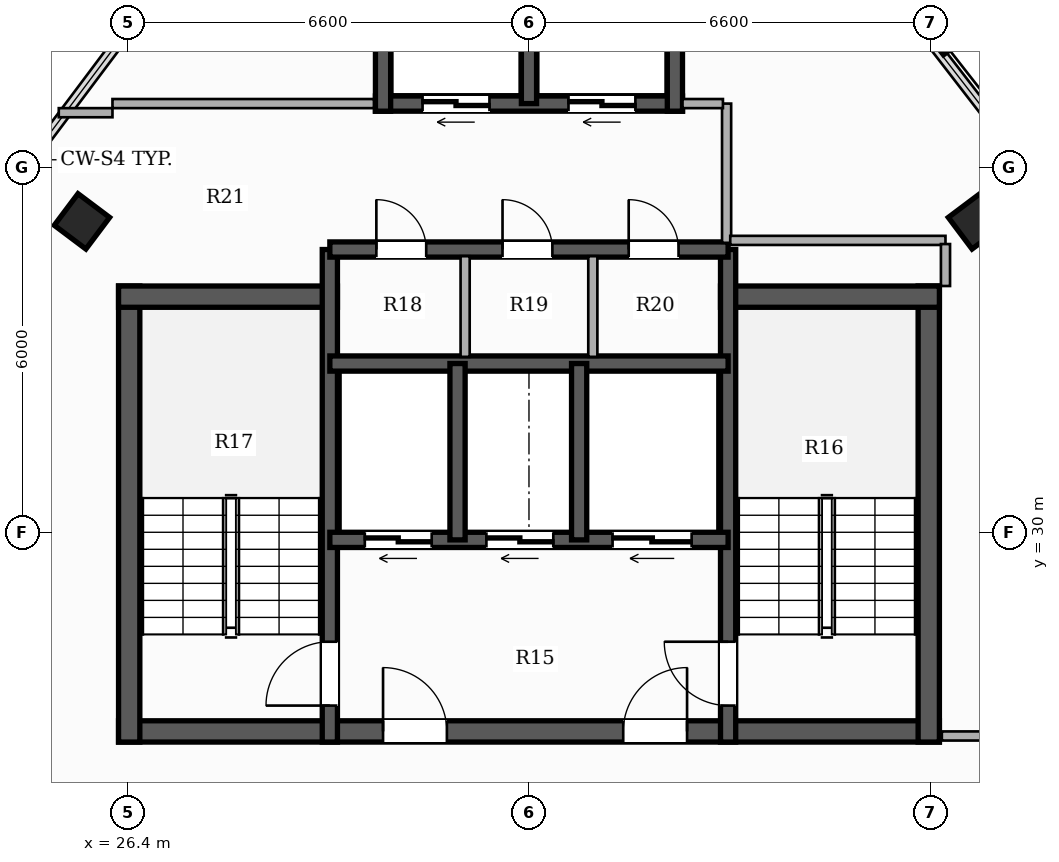
"""IFC4 building model, lengths in metres.
Left out: names, types, materials, properties, quantities, classifications, styles, units other than length and angle.
Written with IfcOpenShell. Run it as: python <this file> out.ifc"""

import sys

from ifc_helpers import new_model, si_unit, direction, frame, frame_2d, origin, origin_2d, place, context, subcontext, project, spatial, rectangle, hollow_rectangle, extrude, element, fill, save


model = new_model("IFC4")
c1 = context("Model", 3, precision=1e-05, world=origin(), true_north=direction((0.0, 1.0)))
c2 = subcontext(c1, "Body", "Model", "MODEL_VIEW")
j1 = project(units=[si_unit("LENGTHUNIT", "METRE"), si_unit("PLANEANGLEUNIT", "RADIAN")], contexts=[c1])
p1 = place(None, origin())
s1 = spatial("IfcSite", under=j1, at=p1, CompositionType="ELEMENT")
p2 = place(p1, origin())
s2 = spatial("IfcBuilding", under=s1, at=p2, CompositionType="ELEMENT")
p3 = place(p2, frame((0.0, 0.0, 263.45)))
s3 = spatial("IfcBuildingStorey", under=s2, at=p3, CompositionType="ELEMENT", Elevation=263.45)
p4 = place(p3, frame((26.25, 26.725, 0.0), z_axis=(0.0, 0.0, 1.0), x_axis=(1.0, 0.0, 0.0)))
e1 = element("IfcWall", 1, at=p4, inside=s3, PredefinedType="SHEAR", context=c2, shape_type="SweptSolid", body=[
    extrude(rectangle(XDim=13.5, YDim=0.35, at=frame_2d((6.75, 0.0))), origin(), (0.0, 0.0, 1.0), 3.3),
])
p5 = place(p4, frame((4.35, 0.0, 0.0)))
e2 = element("IfcOpeningElement", 2, at=p5, cuts=e1, PredefinedType="OPENING", context=c2, shape_type="SweptSolid", body=[
    extrude(rectangle(XDim=1.05, YDim=2.15, at=frame_2d((0.525, 1.075))), frame((0.0, 0.185, 0.0), z_axis=(0.0, -1.0, 0.0), x_axis=(1.0, 0.0, 0.0)), (0.0, 0.0, 1.0), 0.37),
])
p6 = place(p4, frame((8.3, 0.0, 0.0)))
e3 = element("IfcOpeningElement", 3, at=p6, cuts=e1, PredefinedType="OPENING", context=c2, shape_type="SweptSolid", body=[
    extrude(rectangle(XDim=1.05, YDim=2.15, at=frame_2d((0.525, 1.075))), frame((0.0, 0.185, 0.0), z_axis=(0.0, -1.0, 0.0), x_axis=(1.0, 0.0, 0.0)), (0.0, 0.0, 1.0), 0.37),
])
p7 = place(p3, frame((26.425, 26.55, 0.0), z_axis=(0.0, 0.0, 1.0), x_axis=(0.0, 1.0, 0.0)))
e4 = element("IfcWall", 4, at=p7, inside=s3, PredefinedType="SHEAR", context=c2, shape_type="SweptSolid", body=[
    extrude(rectangle(XDim=7.5, YDim=0.35, at=frame_2d((3.75, 0.0))), origin(), (0.0, 0.0, 1.0), 3.3),
])
p8 = place(p3, frame((26.25, 33.875, 0.0), z_axis=(0.0, 0.0, 1.0), x_axis=(1.0, 0.0, 0.0)))
e5 = element("IfcWall", 5, at=p8, inside=s3, PredefinedType="SHEAR", context=c2, shape_type="SweptSolid", body=[
    extrude(rectangle(XDim=3.6, YDim=0.35, at=frame_2d((1.8, 0.0))), origin(), (0.0, 0.0, 1.0), 3.3),
])
p9 = place(p3, frame((39.575, 26.55, 0.0), z_axis=(0.0, 0.0, 1.0), x_axis=(0.0, 1.0, 0.0)))
e6 = element("IfcWall", 6, at=p9, inside=s3, PredefinedType="SHEAR", context=c2, shape_type="SweptSolid", body=[
    extrude(rectangle(XDim=7.5, YDim=0.35, at=frame_2d((3.75, 0.0))), origin(), (0.0, 0.0, 1.0), 3.3),
])
p10 = place(p3, frame((36.15, 33.875, 0.0), z_axis=(0.0, 0.0, 1.0), x_axis=(1.0, 0.0, 0.0)))
e7 = element("IfcWall", 7, at=p10, inside=s3, PredefinedType="SHEAR", context=c2, shape_type="SweptSolid", body=[
    extrude(rectangle(XDim=3.6, YDim=0.35, at=frame_2d((1.8, 0.0))), origin(), (0.0, 0.0, 1.0), 3.3),
])
p11 = place(p3, frame((29.725, 26.55, 0.0), z_axis=(0.0, 0.0, 1.0), x_axis=(0.0, 1.0, 0.0)))
e8 = element("IfcWall", 8, at=p11, inside=s3, PredefinedType="SHEAR", context=c2, shape_type="SweptSolid", body=[
    extrude(rectangle(XDim=8.1, YDim=0.25, at=frame_2d((4.05, 0.0))), origin(), (0.0, 0.0, 1.0), 3.3),
])
p12 = place(p11, frame((0.6, 0.0, 0.0)))
e9 = element("IfcOpeningElement", 9, at=p12, cuts=e8, PredefinedType="OPENING", context=c2, shape_type="SweptSolid", body=[
    extrude(rectangle(XDim=1.05, YDim=2.15, at=frame_2d((0.525, 1.075))), frame((0.0, 0.135, 0.0), z_axis=(0.0, -1.0, 0.0), x_axis=(1.0, 0.0, 0.0)), (0.0, 0.0, 1.0), 0.27),
])
p13 = place(p3, frame((36.275, 26.55, 0.0), z_axis=(0.0, 0.0, 1.0), x_axis=(0.0, 1.0, 0.0)))
e10 = element("IfcWall", 10, at=p13, inside=s3, PredefinedType="SHEAR", context=c2, shape_type="SweptSolid", body=[
    extrude(rectangle(XDim=8.1, YDim=0.25, at=frame_2d((4.05, 0.0))), origin(), (0.0, 0.0, 1.0), 3.3),
])
p14 = place(p13, frame((0.6, 0.0, 0.0)))
e11 = element("IfcOpeningElement", 11, at=p14, cuts=e10, PredefinedType="OPENING", context=c2, shape_type="SweptSolid", body=[
    extrude(rectangle(XDim=1.05, YDim=2.15, at=frame_2d((0.525, 1.075))), frame((0.0, 0.135, 0.0), z_axis=(0.0, -1.0, 0.0), x_axis=(1.0, 0.0, 0.0)), (0.0, 0.0, 1.0), 0.27),
])
p15 = place(p3, frame((36.275, 29.875, 0.0), z_axis=(0.0, 0.0, 1.0), x_axis=(-1.0, 0.0, 0.0)))
e12 = element("IfcWall", 12, at=p15, inside=s3, PredefinedType="SHEAR", context=c2, shape_type="SweptSolid", body=[
    extrude(rectangle(XDim=6.55, YDim=0.25, at=frame_2d((3.275, 0.0))), origin(), (0.0, 0.0, 1.0), 3.3),
])
p16 = place(p15, frame((4.875, 0.0, 0.0)))
e13 = element("IfcOpeningElement", 13, at=p16, cuts=e12, PredefinedType="OPENING", context=c2, shape_type="SweptSolid", body=[
    extrude(rectangle(XDim=1.1, YDim=2.2, at=frame_2d((0.55, 1.1))), frame((0.0, 0.135, 0.0), z_axis=(0.0, -1.0, 0.0), x_axis=(1.0, 0.0, 0.0)), (0.0, 0.0, 1.0), 0.27),
])
p17 = place(p15, frame((2.875, 0.0, 0.0)))
e14 = element("IfcOpeningElement", 14, at=p17, cuts=e12, PredefinedType="OPENING", context=c2, shape_type="SweptSolid", body=[
    extrude(rectangle(XDim=1.1, YDim=2.2, at=frame_2d((0.55, 1.1))), frame((0.0, 0.135, 0.0), z_axis=(0.0, -1.0, 0.0), x_axis=(1.0, 0.0, 0.0)), (0.0, 0.0, 1.0), 0.27),
])
p18 = place(p15, frame((0.6, 0.0, 0.0)))
e15 = element("IfcOpeningElement", 15, at=p18, cuts=e12, PredefinedType="OPENING", context=c2, shape_type="SweptSolid", body=[
    extrude(rectangle(XDim=1.3, YDim=2.2, at=frame_2d((0.65, 1.1))), frame((0.0, 0.135, 0.0), z_axis=(0.0, -1.0, 0.0), x_axis=(1.0, 0.0, 0.0)), (0.0, 0.0, 1.0), 0.27),
])
p19 = place(p3, frame((29.725, 32.775, 0.0), z_axis=(0.0, 0.0, 1.0), x_axis=(1.0, 0.0, 0.0)))
e16 = element("IfcWall", 16, at=p19, inside=s3, PredefinedType="SHEAR", context=c2, shape_type="SweptSolid", body=[
    extrude(rectangle(XDim=6.55, YDim=0.25, at=frame_2d((3.275, 0.0))), origin(), (0.0, 0.0, 1.0), 3.3),
])
for number, where, z_axis, x_axis in (
    (17, (31.825, 29.875, 0.0), (0.0, 0.0, 1.0), (0.0, 1.0, 0.0)),
    (18, (33.825, 29.875, 0.0), (0.0, 0.0, 1.0), (0.0, 1.0, 0.0)),
):
    element("IfcWall", number, at=place(p3, frame(where, z_axis=z_axis, x_axis=x_axis)), inside=s3, PredefinedType="SHEAR", context=c2, shape_type="SweptSolid", body=[
        extrude(rectangle(XDim=2.9, YDim=0.25, at=frame_2d((1.45, 0.0))), origin(), (0.0, 0.0, 1.0), 3.3),
    ])
p20 = place(p3, frame((29.725, 34.65, 0.0), z_axis=(0.0, 0.0, 1.0), x_axis=(1.0, 0.0, 0.0)))
e19 = element("IfcWall", 19, at=p20, inside=s3, PredefinedType="SHEAR", context=c2, shape_type="SweptSolid", body=[
    extrude(rectangle(XDim=6.55, YDim=0.25, at=frame_2d((3.275, 0.0))), origin(), (0.0, 0.0, 1.0), 3.3),
])
p21 = place(p20, frame((0.765, 0.0, 0.0)))
e20 = element("IfcOpeningElement", 20, at=p21, cuts=e19, PredefinedType="OPENING", context=c2, shape_type="SweptSolid", body=[
    extrude(rectangle(XDim=0.82, YDim=2.1, at=frame_2d((0.41, 1.05))), frame((0.0, 0.135, 0.0), z_axis=(0.0, -1.0, 0.0), x_axis=(1.0, 0.0, 0.0)), (0.0, 0.0, 1.0), 0.27),
])
p22 = place(p20, frame((2.84, 0.0, 0.0)))
e21 = element("IfcOpeningElement", 21, at=p22, cuts=e19, PredefinedType="OPENING", context=c2, shape_type="SweptSolid", body=[
    extrude(rectangle(XDim=0.82, YDim=2.1, at=frame_2d((0.41, 1.05))), frame((0.0, 0.135, 0.0), z_axis=(0.0, -1.0, 0.0), x_axis=(1.0, 0.0, 0.0)), (0.0, 0.0, 1.0), 0.27),
])
p23 = place(p20, frame((4.915, 0.0, 0.0)))
e22 = element("IfcOpeningElement", 22, at=p23, cuts=e19, PredefinedType="OPENING", context=c2, shape_type="SweptSolid", body=[
    extrude(rectangle(XDim=0.82, YDim=2.1, at=frame_2d((0.41, 1.05))), frame((0.0, 0.135, 0.0), z_axis=(0.0, -1.0, 0.0), x_axis=(1.0, 0.0, 0.0)), (0.0, 0.0, 1.0), 0.27),
])
p24 = place(p3, frame((35.525, 37.05, 0.0), z_axis=(0.0, 0.0, 1.0), x_axis=(-1.0, 0.0, 0.0)))
e23 = element("IfcWall", 23, at=p24, inside=s3, PredefinedType="SHEAR", context=c2, shape_type="SweptSolid", body=[
    extrude(rectangle(XDim=5.05, YDim=0.25, at=frame_2d((2.525, 0.0))), origin(), (0.0, 0.0, 1.0), 3.3),
])
p25 = place(p24, frame((3.175, 0.0, 0.0)))
e24 = element("IfcOpeningElement", 24, at=p25, cuts=e23, PredefinedType="OPENING", context=c2, shape_type="SweptSolid", body=[
    extrude(rectangle(XDim=1.1, YDim=2.2, at=frame_2d((0.55, 1.1))), frame((0.0, 0.135, 0.0), z_axis=(0.0, -1.0, 0.0), x_axis=(1.0, 0.0, 0.0)), (0.0, 0.0, 1.0), 0.27),
])
p26 = place(p24, frame((0.775, 0.0, 0.0)))
e25 = element("IfcOpeningElement", 25, at=p26, cuts=e23, PredefinedType="OPENING", context=c2, shape_type="SweptSolid", body=[
    extrude(rectangle(XDim=1.1, YDim=2.2, at=frame_2d((0.55, 1.1))), frame((0.0, 0.135, 0.0), z_axis=(0.0, -1.0, 0.0), x_axis=(1.0, 0.0, 0.0)), (0.0, 0.0, 1.0), 0.27),
])
for number, where, z_axis, x_axis in (
    (26, (30.6, 36.925, 0.0), (0.0, 0.0, 1.0), (0.0, 1.0, 0.0)),
    (27, (35.4, 36.925, 0.0), (0.0, 0.0, 1.0), (0.0, 1.0, 0.0)),
):
    element("IfcWall", number, at=place(p3, frame(where, z_axis=z_axis, x_axis=x_axis)), inside=s3, PredefinedType="SHEAR", context=c2, shape_type="SweptSolid", body=[
        extrude(rectangle(XDim=2.8, YDim=0.25, at=frame_2d((1.4, 0.0))), origin(), (0.0, 0.0, 1.0), 3.3),
    ])
p27 = place(p3, frame((33.0, 37.05, 0.0), z_axis=(0.0, 0.0, 1.0), x_axis=(0.0, 1.0, 0.0)))
e28 = element("IfcWall", 28, at=p27, inside=s3, PredefinedType="SHEAR", context=c2, shape_type="SweptSolid", body=[
    extrude(rectangle(XDim=2.55, YDim=0.25, at=frame_2d((1.275, 0.0))), origin(), (0.0, 0.0, 1.0), 3.3),
])
for number, where, z_axis, x_axis in (
    (29, (25.648, 35.113, 0.0), (0.0, 0.0, 1.0), (0.6, 0.8, 0.0)),
    (30, (40.352, 35.113, 0.0), (0.0, 0.0, 1.0), (-0.6, 0.8, 0.0)),
):
    element("IfcColumn", number, at=place(p3, frame(where, z_axis=z_axis, x_axis=x_axis)), inside=s3, PredefinedType="COLUMN", context=c2, shape_type="SweptSolid", body=[
        extrude(hollow_rectangle(XDim=0.65, YDim=0.65, WallThickness=0.022, at=origin_2d()), origin(), (0.0, 0.0, 1.0), 3.3),
    ])
p28 = place(p3, frame((36.25, 34.76, 0.0), z_axis=(0.0, 0.0, 1.0), x_axis=(0.0, 1.0, 0.0)))
e31 = element("IfcWall", 31, at=p28, inside=s3, PredefinedType="PARTITIONING", context=c2, shape_type="SweptSolid", body=[
    extrude(rectangle(XDim=2.29, YDim=0.15, at=frame_2d((1.145, 0.0))), origin(), (0.0, 0.0, 1.0), 2.425),
])
p29 = place(p3, frame((35.525, 37.05, 0.0), z_axis=(0.0, 0.0, 1.0), x_axis=(1.0, 0.0, 0.0)))
e32 = element("IfcWall", 32, at=p29, inside=s3, PredefinedType="PARTITIONING", context=c2, shape_type="SweptSolid", body=[
    extrude(rectangle(XDim=0.665, YDim=0.15, at=frame_2d((0.333, 0.0))), origin(), (0.0, 0.0, 1.0), 2.425),
])
for number, where, z_axis, x_axis in (
    (33, (31.95, 32.885, 0.0), (0.0, 0.0, 1.0), (0.0, 1.0, 0.0)),
    (34, (34.05, 32.885, 0.0), (0.0, 0.0, 1.0), (0.0, 1.0, 0.0)),
):
    element("IfcWall", number, at=place(p3, frame(where, z_axis=z_axis, x_axis=x_axis)), inside=s3, PredefinedType="PARTITIONING", context=c2, shape_type="SweptSolid", body=[
        extrude(rectangle(XDim=1.655, YDim=0.15, at=frame_2d((0.828, 0.0))), origin(), (0.0, 0.0, 1.0), 3.06),
    ])
p30 = place(p3, frame((25.267, 36.9, 0.0), z_axis=(0.0, 0.0, 1.0), x_axis=(1.0, 0.0, 0.0)))
e35 = element("IfcWall", 35, at=p30, inside=s3, PredefinedType="PARTITIONING", context=c2, shape_type="SweptSolid", body=[
    extrude(rectangle(XDim=0.883, YDim=0.15, at=frame_2d((0.441, 0.0))), origin(), (0.0, 0.0, 1.0), 3.06),
])
p31 = place(p3, frame((39.79, 26.65, 0.0), z_axis=(0.0, 0.0, 1.0), x_axis=(1.0, 0.0, 0.0)))
e36 = element("IfcWall", 36, at=p31, inside=s3, PredefinedType="PARTITIONING", context=c2, shape_type="SweptSolid", body=[
    extrude(rectangle(XDim=2.46, YDim=0.15, at=frame_2d((1.23, 0.0))), origin(), (0.0, 0.0, 1.0), 2.565),
])
p32 = place(p3, frame((26.15, 37.05, 0.0), z_axis=(0.0, 0.0, 1.0), x_axis=(1.0, 0.0, 0.0)))
e37 = element("IfcWall", 37, at=p32, inside=s3, PredefinedType="PARTITIONING", context=c2, shape_type="SweptSolid", body=[
    extrude(rectangle(XDim=4.3, YDim=0.15, at=frame_2d((2.15, 0.0))), origin(), (0.0, 0.0, 1.0), 2.425),
])
p33 = place(p3, frame((36.31, 34.8, 0.0), z_axis=(0.0, 0.0, 1.0), x_axis=(1.0, 0.0, 0.0)))
e38 = element("IfcWall", 38, at=p33, inside=s3, PredefinedType="PARTITIONING", context=c2, shape_type="SweptSolid", body=[
    extrude(rectangle(XDim=3.54, YDim=0.15, at=frame_2d((1.77, 0.0))), origin(), (0.0, 0.0, 1.0), 2.425),
])
p34 = place(p3, frame((39.85, 34.74, 0.0), z_axis=(0.0, 0.0, 1.0), x_axis=(0.0, -1.0, 0.0)))
e39 = element("IfcWall", 39, at=p34, inside=s3, PredefinedType="PARTITIONING", context=c2, shape_type="SweptSolid", body=[
    extrude(rectangle(XDim=0.69, YDim=0.15, at=frame_2d((0.345, 0.0))), origin(), (0.0, 0.0, 1.0), 2.773),
])
p35 = place(p12, origin())
e40 = element("IfcDoor", 40, at=p35, inside=s3, OperationType="SINGLE_SWING_LEFT", PredefinedType="DOOR", context=c2, shape_type="SweptSolid", body=[
    extrude(rectangle(XDim=1.05, YDim=2.15, at=frame_2d((0.525, 1.075))), frame((0.0, 0.025, 0.0), z_axis=(0.0, -1.0, 0.0), x_axis=(1.0, 0.0, 0.0)), (0.0, 0.0, 1.0), 0.05),
])
fill(e9, e40)
p36 = place(p14, origin())
e41 = element("IfcDoor", 41, at=p36, inside=s3, OperationType="SINGLE_SWING_RIGHT", PredefinedType="DOOR", context=c2, shape_type="SweptSolid", body=[
    extrude(rectangle(XDim=1.05, YDim=2.15, at=frame_2d((0.525, 1.075))), frame((0.0, 0.025, 0.0), z_axis=(0.0, -1.0, 0.0), x_axis=(1.0, 0.0, 0.0)), (0.0, 0.0, 1.0), 0.05),
])
fill(e11, e41)
p37 = place(p5, origin())
e42 = element("IfcDoor", 42, at=p37, inside=s3, OperationType="SINGLE_SWING_LEFT", PredefinedType="DOOR", context=c2, shape_type="SweptSolid", body=[
    extrude(rectangle(XDim=1.05, YDim=2.15, at=frame_2d((0.525, 1.075))), frame((0.0, 0.025, 0.0), z_axis=(0.0, -1.0, 0.0), x_axis=(1.0, 0.0, 0.0)), (0.0, 0.0, 1.0), 0.05),
])
fill(e2, e42)
p38 = place(p6, origin())
e43 = element("IfcDoor", 43, at=p38, inside=s3, OperationType="SINGLE_SWING_RIGHT", PredefinedType="DOOR", context=c2, shape_type="SweptSolid", body=[
    extrude(rectangle(XDim=1.05, YDim=2.15, at=frame_2d((0.525, 1.075))), frame((0.0, 0.025, 0.0), z_axis=(0.0, -1.0, 0.0), x_axis=(1.0, 0.0, 0.0)), (0.0, 0.0, 1.0), 0.05),
])
fill(e3, e43)
p39 = place(p16, origin())
e44 = element("IfcDoor", 44, at=p39, inside=s3, OperationType="DOUBLE_DOOR_SLIDING", PredefinedType="DOOR", context=c2, shape_type="SweptSolid", body=[
    extrude(rectangle(XDim=1.1, YDim=2.2, at=frame_2d((0.55, 1.1))), frame((0.0, 0.025, 0.0), z_axis=(0.0, -1.0, 0.0), x_axis=(1.0, 0.0, 0.0)), (0.0, 0.0, 1.0), 0.05),
])
fill(e13, e44)
p40 = place(p17, origin())
e45 = element("IfcDoor", 45, at=p40, inside=s3, OperationType="DOUBLE_DOOR_SLIDING", PredefinedType="DOOR", context=c2, shape_type="SweptSolid", body=[
    extrude(rectangle(XDim=1.1, YDim=2.2, at=frame_2d((0.55, 1.1))), frame((0.0, 0.025, 0.0), z_axis=(0.0, -1.0, 0.0), x_axis=(1.0, 0.0, 0.0)), (0.0, 0.0, 1.0), 0.05),
])
fill(e14, e45)
p41 = place(p18, origin())
e46 = element("IfcDoor", 46, at=p41, inside=s3, OperationType="DOUBLE_DOOR_SLIDING", PredefinedType="DOOR", context=c2, shape_type="SweptSolid", body=[
    extrude(rectangle(XDim=1.3, YDim=2.2, at=frame_2d((0.65, 1.1))), frame((0.0, 0.025, 0.0), z_axis=(0.0, -1.0, 0.0), x_axis=(1.0, 0.0, 0.0)), (0.0, 0.0, 1.0), 0.05),
])
fill(e15, e46)
p42 = place(p25, origin())
e47 = element("IfcDoor", 47, at=p42, inside=s3, OperationType="DOUBLE_DOOR_SLIDING", PredefinedType="DOOR", context=c2, shape_type="SweptSolid", body=[
    extrude(rectangle(XDim=1.1, YDim=2.2, at=frame_2d((0.55, 1.1))), frame((0.0, 0.025, 0.0), z_axis=(0.0, -1.0, 0.0), x_axis=(1.0, 0.0, 0.0)), (0.0, 0.0, 1.0), 0.05),
])
fill(e24, e47)
p43 = place(p26, origin())
e48 = element("IfcDoor", 48, at=p43, inside=s3, OperationType="DOUBLE_DOOR_SLIDING", PredefinedType="DOOR", context=c2, shape_type="SweptSolid", body=[
    extrude(rectangle(XDim=1.1, YDim=2.2, at=frame_2d((0.55, 1.1))), frame((0.0, 0.025, 0.0), z_axis=(0.0, -1.0, 0.0), x_axis=(1.0, 0.0, 0.0)), (0.0, 0.0, 1.0), 0.05),
])
fill(e25, e48)
p44 = place(p21, origin())
e49 = element("IfcDoor", 49, at=p44, inside=s3, OperationType="SINGLE_SWING_LEFT", PredefinedType="DOOR", context=c2, shape_type="SweptSolid", body=[
    extrude(rectangle(XDim=0.82, YDim=2.1, at=frame_2d((0.41, 1.05))), frame((0.0, 0.025, 0.0), z_axis=(0.0, -1.0, 0.0), x_axis=(1.0, 0.0, 0.0)), (0.0, 0.0, 1.0), 0.05),
])
fill(e20, e49)
p45 = place(p22, origin())
e50 = element("IfcDoor", 50, at=p45, inside=s3, OperationType="SINGLE_SWING_LEFT", PredefinedType="DOOR", context=c2, shape_type="SweptSolid", body=[
    extrude(rectangle(XDim=0.82, YDim=2.1, at=frame_2d((0.41, 1.05))), frame((0.0, 0.025, 0.0), z_axis=(0.0, -1.0, 0.0), x_axis=(1.0, 0.0, 0.0)), (0.0, 0.0, 1.0), 0.05),
])
fill(e21, e50)
p46 = place(p23, origin())
e51 = element("IfcDoor", 51, at=p46, inside=s3, OperationType="SINGLE_SWING_LEFT", PredefinedType="DOOR", context=c2, shape_type="SweptSolid", body=[
    extrude(rectangle(XDim=0.82, YDim=2.1, at=frame_2d((0.41, 1.05))), frame((0.0, 0.025, 0.0), z_axis=(0.0, -1.0, 0.0), x_axis=(1.0, 0.0, 0.0)), (0.0, 0.0, 1.0), 0.05),
])
fill(e22, e51)
save(model, sys.argv[1])
